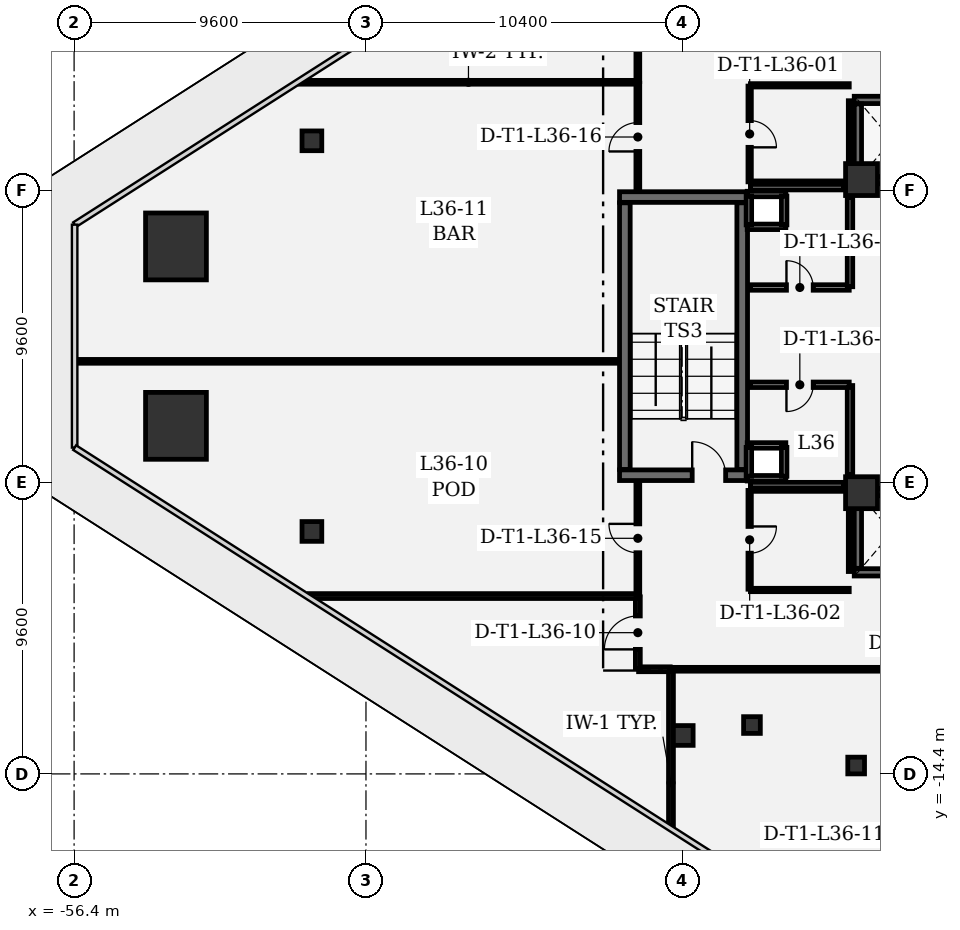
"""IFC4 building model, lengths in metres.
Left out: names, types, materials, properties, quantities, classifications, styles, units other than length and angle.
Written with IfcOpenShell. Run it as: python <this file> out.ifc"""

import sys

from ifc_helpers import new_model, si_unit, direction, frame, frame_2d, origin, origin_2d, place, context, subcontext, project, spatial, rectangle, extrude, element, fill, save


model = new_model("IFC4")
c1 = context("Model", 3, precision=1e-05, world=origin(), true_north=direction((0.0, 1.0)))
c2 = subcontext(c1, "Body", "Model", "MODEL_VIEW")
j1 = project(units=[si_unit("LENGTHUNIT", "METRE"), si_unit("PLANEANGLEUNIT", "RADIAN")], contexts=[c1])
p1 = place(None, origin())
s1 = spatial("IfcSite", under=j1, at=p1, CompositionType="ELEMENT")
p2 = place(p1, origin())
s2 = spatial("IfcBuilding", under=s1, at=p2, CompositionType="ELEMENT")
p3 = place(p2, frame((0.0, 0.0, 158.4)))
s3 = spatial("IfcBuildingStorey", under=s2, at=p3, CompositionType="ELEMENT", Elevation=158.4)
for number, where, z_axis, x_axis in (
    (1, (-53.049, 2.951, 0.0), (0.0, 0.0, 1.0), (1.0, 0.0, 0.0)),
    (2, (-53.049, -2.951, 0.0), (0.0, 0.0, 1.0), (1.0, 0.0, 0.0)),
):
    element("IfcColumn", number, at=place(p3, frame(where, z_axis=z_axis, x_axis=x_axis)), inside=s3, PredefinedType="COLUMN", context=c2, shape_type="SweptSolid", body=[
        extrude(rectangle(XDim=2.0, YDim=2.2, at=origin_2d()), origin(), (0.0, 0.0, 1.0), 4.05),
    ])
for number, where, z_axis, x_axis in (
    (3, (-30.5, 5.15, 0.0), (0.0, 0.0, 1.0), (1.0, 0.0, 0.0)),
    (4, (-30.5, -5.15, 0.0), (0.0, 0.0, 1.0), (1.0, 0.0, 0.0)),
):
    element("IfcColumn", number, at=place(p3, frame(where, z_axis=z_axis, x_axis=x_axis)), inside=s3, PredefinedType="COLUMN", context=c2, shape_type="SweptSolid", body=[
        extrude(rectangle(XDim=1.05, YDim=1.05, at=origin_2d()), origin(), (0.0, 0.0, 1.0), 4.05),
    ])
for number, where, z_axis, x_axis in (
    (5, (-48.578, 6.425, 0.0), (0.0, 0.0, 1.0), (1.0, 0.0, 0.0)),
    (6, (-48.578, -6.425, 0.0), (0.0, 0.0, 1.0), (1.0, 0.0, 0.0)),
    (7, (-36.365, -13.135, 0.0), (0.0, 0.0, 1.0), (1.0, 0.0, 0.0)),
):
    element("IfcColumn", number, at=place(p3, frame(where, z_axis=z_axis, x_axis=x_axis)), inside=s3, PredefinedType="COLUMN", context=c2, shape_type="SweptSolid", body=[
        extrude(rectangle(XDim=0.65, YDim=0.65, at=origin_2d()), origin(), (0.0, 0.0, 1.0), 4.05),
    ])
for number, where, z_axis, x_axis in (
    (8, (-34.104, -12.792, 0.0), (0.0, 0.0, 1.0), (1.0, 0.0, 0.0)),
    (9, (-30.677, -14.124, 0.0), (0.0, 0.0, 1.0), (1.0, 0.0, 0.0)),
):
    element("IfcColumn", number, at=place(p3, frame(where, z_axis=z_axis, x_axis=x_axis)), inside=s3, PredefinedType="COLUMN", context=c2, shape_type="SweptSolid", body=[
        extrude(rectangle(XDim=0.55, YDim=0.55, at=origin_2d()), origin(), (0.0, 0.0, 1.0), 4.05),
    ])
p4 = place(p3, frame((-38.46, -4.575, 0.0), z_axis=(0.0, 0.0, 1.0), x_axis=(1.0, 0.0, 0.0)))
e10 = element("IfcWall", 10, at=p4, inside=s3, PredefinedType="SHEAR", context=c2, shape_type="SweptSolid", body=[
    extrude(rectangle(XDim=4.21, YDim=0.35, at=frame_2d((2.105, 0.0))), origin(), (0.0, 0.0, 1.0), 3.78),
])
p5 = place(p4, frame((2.39, 0.0, 0.0)))
e11 = element("IfcOpeningElement", 11, at=p5, cuts=e10, PredefinedType="OPENING", context=c2, shape_type="SweptSolid", body=[
    extrude(rectangle(XDim=1.1, YDim=2.2, at=frame_2d((0.55, 1.1))), frame((0.0, 0.185, 0.0), z_axis=(0.0, -1.0, 0.0), x_axis=(1.0, 0.0, 0.0)), (0.0, 0.0, 1.0), 0.37),
])
p6 = place(p3, frame((-34.25, 4.575, 0.0), z_axis=(0.0, 0.0, 1.0), x_axis=(-1.0, 0.0, 0.0)))
e12 = element("IfcWall", 12, at=p6, inside=s3, PredefinedType="SHEAR", context=c2, shape_type="SweptSolid", body=[
    extrude(rectangle(XDim=4.21, YDim=0.35, at=frame_2d((2.105, 0.0))), origin(), (0.0, 0.0, 1.0), 3.78),
])
for number, where, z_axis, x_axis in (
    (13, (-34.425, -4.385, 0.0), (0.0, 0.0, 1.0), (0.0, 1.0, 0.0)),
    (14, (-38.285, 4.385, 0.0), (0.0, 0.0, 1.0), (0.0, -1.0, 0.0)),
):
    element("IfcWall", number, at=place(p3, frame(where, z_axis=z_axis, x_axis=x_axis)), inside=s3, PredefinedType="SHEAR", context=c2, shape_type="SweptSolid", body=[
        extrude(rectangle(XDim=8.77, YDim=0.35, at=frame_2d((4.385, 0.0))), origin(), (0.0, 0.0, 1.0), 3.78),
    ])
for number, where, z_axis, x_axis in (
    (15, (-28.26, 5.13, 0.0), (0.0, 0.0, 1.0), (-1.0, 0.0, 0.0)),
    (16, (-30.74, 7.77, 0.0), (0.0, 0.0, 1.0), (1.0, 0.0, 0.0)),
):
    element("IfcWall", number, at=place(p3, frame(where, z_axis=z_axis, x_axis=x_axis)), inside=s3, PredefinedType="SHEAR", context=c2, shape_type="SweptSolid", body=[
        extrude(rectangle(XDim=2.48, YDim=0.24, at=frame_2d((1.24, 0.0))), origin(), (0.0, 0.0, 1.0), 3.78),
    ])
p7 = place(p3, frame((-30.62, 5.262, 0.0), z_axis=(0.0, 0.0, 1.0), x_axis=(0.0, 1.0, 0.0)))
e17 = element("IfcWall", 17, at=p7, inside=s3, PredefinedType="SHEAR", context=c2, shape_type="SweptSolid", body=[
    extrude(rectangle(XDim=2.376, YDim=0.24, at=frame_2d((1.188, 0.0))), origin(), (0.0, 0.0, 1.0), 3.78),
])
for number, where, z_axis, x_axis in (
    (18, (-28.26, -7.77, 0.0), (0.0, 0.0, 1.0), (-1.0, 0.0, 0.0)),
    (19, (-30.74, -5.13, 0.0), (0.0, 0.0, 1.0), (1.0, 0.0, 0.0)),
):
    element("IfcWall", number, at=place(p3, frame(where, z_axis=z_axis, x_axis=x_axis)), inside=s3, PredefinedType="SHEAR", context=c2, shape_type="SweptSolid", body=[
        extrude(rectangle(XDim=2.48, YDim=0.24, at=frame_2d((1.24, 0.0))), origin(), (0.0, 0.0, 1.0), 3.78),
    ])
p8 = place(p3, frame((-30.62, -7.638, 0.0), z_axis=(0.0, 0.0, 1.0), x_axis=(0.0, 1.0, 0.0)))
e20 = element("IfcWall", 20, at=p8, inside=s3, PredefinedType="SHEAR", context=c2, shape_type="SweptSolid", body=[
    extrude(rectangle(XDim=2.376, YDim=0.24, at=frame_2d((1.188, 0.0))), origin(), (0.0, 0.0, 1.0), 3.78),
])
for number, where, z_axis, x_axis in (
    (21, (-32.99, 3.595, 0.0), (0.0, 0.0, 1.0), (-1.0, 0.0, 0.0)),
    (22, (-34.26, 4.675, 0.0), (0.0, 0.0, 1.0), (1.0, 0.0, 0.0)),
):
    element("IfcWall", number, at=place(p3, frame(where, z_axis=z_axis, x_axis=x_axis)), inside=s3, PredefinedType="PARTITIONING", context=c2, shape_type="SweptSolid", body=[
        extrude(rectangle(XDim=1.27, YDim=0.18, at=frame_2d((0.635, 0.0))), origin(), (0.0, 0.0, 1.0), 3.78),
    ])
for number, where, z_axis, x_axis in (
    (23, (-34.205, 3.66, 0.0), (0.0, 0.0, 1.0), (0.0, 1.0, 0.0)),
    (24, (-33.045, 4.61, 0.0), (0.0, 0.0, 1.0), (0.0, -1.0, 0.0)),
):
    element("IfcWall", number, at=place(p3, frame(where, z_axis=z_axis, x_axis=x_axis)), inside=s3, PredefinedType="PARTITIONING", context=c2, shape_type="SweptSolid", body=[
        extrude(rectangle(XDim=0.95, YDim=0.18, at=frame_2d((0.475, 0.0))), origin(), (0.0, 0.0, 1.0), 3.78),
    ])
for number, where, z_axis, x_axis in (
    (25, (-32.99, -4.675, 0.0), (0.0, 0.0, 1.0), (-1.0, 0.0, 0.0)),
    (26, (-34.26, -3.595, 0.0), (0.0, 0.0, 1.0), (1.0, 0.0, 0.0)),
):
    element("IfcWall", number, at=place(p3, frame(where, z_axis=z_axis, x_axis=x_axis)), inside=s3, PredefinedType="PARTITIONING", context=c2, shape_type="SweptSolid", body=[
        extrude(rectangle(XDim=1.27, YDim=0.18, at=frame_2d((0.635, 0.0))), origin(), (0.0, 0.0, 1.0), 3.78),
    ])
for number, where, z_axis, x_axis in (
    (27, (-34.205, -4.61, 0.0), (0.0, 0.0, 1.0), (0.0, 1.0, 0.0)),
    (28, (-33.045, -3.66, 0.0), (0.0, 0.0, 1.0), (0.0, -1.0, 0.0)),
):
    element("IfcWall", number, at=place(p3, frame(where, z_axis=z_axis, x_axis=x_axis)), inside=s3, PredefinedType="PARTITIONING", context=c2, shape_type="SweptSolid", body=[
        extrude(rectangle(XDim=0.95, YDim=0.18, at=frame_2d((0.475, 0.0))), origin(), (0.0, 0.0, 1.0), 3.78),
    ])
p9 = place(p3, frame((-34.18, 8.225, 0.0), z_axis=(0.0, 0.0, 1.0), x_axis=(0.0, -1.0, 0.0)))
e29 = element("IfcWall", 29, at=p9, inside=s3, PredefinedType="PARTITIONING", context=c2, shape_type="SweptSolid", body=[
    extrude(rectangle(XDim=3.15, YDim=0.11, at=frame_2d((1.575, 0.0))), origin(), (0.0, 0.0, 1.0), 3.78),
])
p10 = place(p9, frame((1.135, 0.0, 0.0)))
e30 = element("IfcOpeningElement", 30, at=p10, cuts=e29, PredefinedType="OPENING", context=c2, shape_type="SweptSolid", body=[
    extrude(rectangle(XDim=0.88, YDim=2.1, at=frame_2d((0.44, 1.05))), frame((0.0, 0.065, 0.0), z_axis=(0.0, -1.0, 0.0), x_axis=(1.0, 0.0, 0.0)), (0.0, 0.0, 1.0), 0.13),
])
p11 = place(p3, frame((-34.155, 5.05, 0.0), z_axis=(0.0, 0.0, 1.0), x_axis=(1.0, 0.0, 0.0)))
e31 = element("IfcWall", 31, at=p11, inside=s3, PredefinedType="PARTITIONING", context=c2, shape_type="SweptSolid", body=[
    extrude(rectangle(XDim=3.065, YDim=0.11, at=frame_2d((1.532, 0.0))), origin(), (0.0, 0.0, 1.0), 3.78),
])
p12 = place(p3, frame((-30.88, 5.74, 0.0), z_axis=(0.0, 0.0, 1.0), x_axis=(0.0, 1.0, 0.0)))
e32 = element("IfcWall", 32, at=p12, inside=s3, PredefinedType="PARTITIONING", context=c2, shape_type="SweptSolid", body=[
    extrude(rectangle(XDim=2.003, YDim=0.11, at=frame_2d((1.001, 0.0))), origin(), (0.0, 0.0, 1.0), 3.78),
])
for number, where, z_axis, x_axis in (
    (33, (-30.905, 8.25, 0.0), (0.0, 0.0, 1.0), (-1.0, 0.0, 0.0)),
    (34, (-34.155, -8.35, 0.0), (0.0, 0.0, 1.0), (1.0, 0.0, 0.0)),
):
    element("IfcWall", number, at=place(p3, frame(where, z_axis=z_axis, x_axis=x_axis)), inside=s3, PredefinedType="PARTITIONING", context=c2, shape_type="SweptSolid", body=[
        extrude(rectangle(XDim=3.25, YDim=0.11, at=frame_2d((1.625, 0.0))), origin(), (0.0, 0.0, 1.0), 3.78),
    ])
p13 = place(p3, frame((-30.88, -7.743, 0.0), z_axis=(0.0, 0.0, 1.0), x_axis=(0.0, 1.0, 0.0)))
e35 = element("IfcWall", 35, at=p13, inside=s3, PredefinedType="PARTITIONING", context=c2, shape_type="SweptSolid", body=[
    extrude(rectangle(XDim=2.003, YDim=0.11, at=frame_2d((1.001, 0.0))), origin(), (0.0, 0.0, 1.0), 3.78),
])
p14 = place(p3, frame((-31.09, -5.05, 0.0), z_axis=(0.0, 0.0, 1.0), x_axis=(-1.0, 0.0, 0.0)))
e36 = element("IfcWall", 36, at=p14, inside=s3, PredefinedType="PARTITIONING", context=c2, shape_type="SweptSolid", body=[
    extrude(rectangle(XDim=3.065, YDim=0.11, at=frame_2d((1.532, 0.0))), origin(), (0.0, 0.0, 1.0), 3.78),
])
p15 = place(p3, frame((-34.18, -5.075, 0.0), z_axis=(0.0, 0.0, 1.0), x_axis=(0.0, -1.0, 0.0)))
e37 = element("IfcWall", 37, at=p15, inside=s3, PredefinedType="PARTITIONING", context=c2, shape_type="SweptSolid", body=[
    extrude(rectangle(XDim=3.25, YDim=0.11, at=frame_2d((1.625, 0.0))), origin(), (0.0, 0.0, 1.0), 3.78),
])
p16 = place(p15, frame((1.185, 0.0, 0.0)))
e38 = element("IfcOpeningElement", 38, at=p16, cuts=e37, PredefinedType="OPENING", context=c2, shape_type="SweptSolid", body=[
    extrude(rectangle(XDim=0.88, YDim=2.1, at=frame_2d((0.44, 1.05))), frame((0.0, 0.065, 0.0), z_axis=(0.0, -1.0, 0.0), x_axis=(1.0, 0.0, 0.0)), (0.0, 0.0, 1.0), 0.13),
])
p17 = place(p3, frame((-34.155, 1.6, 0.0), z_axis=(0.0, 0.0, 1.0), x_axis=(1.0, 0.0, 0.0)))
e39 = element("IfcWall", 39, at=p17, inside=s3, PredefinedType="PARTITIONING", context=c2, shape_type="SweptSolid", body=[
    extrude(rectangle(XDim=3.25, YDim=0.18, at=frame_2d((1.625, 0.0))), origin(), (0.0, 0.0, 1.0), 3.78),
])
p18 = place(p17, frame((1.185, 0.0, 0.0)))
e40 = element("IfcOpeningElement", 40, at=p18, cuts=e39, PredefinedType="OPENING", context=c2, shape_type="SweptSolid", body=[
    extrude(rectangle(XDim=0.88, YDim=2.1, at=frame_2d((0.44, 1.05))), frame((0.0, 0.1, 0.0), z_axis=(0.0, -1.0, 0.0), x_axis=(1.0, 0.0, 0.0)), (0.0, 0.0, 1.0), 0.2),
])
p19 = place(p3, frame((-30.88, 1.625, 0.0), z_axis=(0.0, 0.0, 1.0), x_axis=(0.0, 1.0, 0.0)))
e41 = element("IfcWall", 41, at=p19, inside=s3, PredefinedType="PARTITIONING", context=c2, shape_type="SweptSolid", body=[
    extrude(rectangle(XDim=2.935, YDim=0.18, at=frame_2d((1.468, 0.0))), origin(), (0.0, 0.0, 1.0), 3.78),
])
for number, where, z_axis, x_axis in (
    (42, (-31.09, 4.9, 0.0), (0.0, 0.0, 1.0), (-1.0, 0.0, 0.0)),
    (43, (-34.155, -4.9, 0.0), (0.0, 0.0, 1.0), (1.0, 0.0, 0.0)),
):
    element("IfcWall", number, at=place(p3, frame(where, z_axis=z_axis, x_axis=x_axis)), inside=s3, PredefinedType="PARTITIONING", context=c2, shape_type="SweptSolid", body=[
        extrude(rectangle(XDim=3.065, YDim=0.18, at=frame_2d((1.532, 0.0))), origin(), (0.0, 0.0, 1.0), 3.78),
    ])
p20 = place(p3, frame((-30.88, -4.56, 0.0), z_axis=(0.0, 0.0, 1.0), x_axis=(0.0, 1.0, 0.0)))
e44 = element("IfcWall", 44, at=p20, inside=s3, PredefinedType="PARTITIONING", context=c2, shape_type="SweptSolid", body=[
    extrude(rectangle(XDim=2.935, YDim=0.18, at=frame_2d((1.468, 0.0))), origin(), (0.0, 0.0, 1.0), 3.78),
])
p21 = place(p3, frame((-30.905, -1.6, 0.0), z_axis=(0.0, 0.0, 1.0), x_axis=(-1.0, 0.0, 0.0)))
e45 = element("IfcWall", 45, at=p21, inside=s3, PredefinedType="PARTITIONING", context=c2, shape_type="SweptSolid", body=[
    extrude(rectangle(XDim=3.25, YDim=0.18, at=frame_2d((1.625, 0.0))), origin(), (0.0, 0.0, 1.0), 3.78),
])
p22 = place(p21, frame((1.185, 0.0, 0.0)))
e46 = element("IfcOpeningElement", 46, at=p22, cuts=e45, PredefinedType="OPENING", context=c2, shape_type="SweptSolid", body=[
    extrude(rectangle(XDim=0.88, YDim=2.1, at=frame_2d((0.44, 1.05))), frame((0.0, 0.1, 0.0), z_axis=(0.0, -1.0, 0.0), x_axis=(1.0, 0.0, 0.0)), (0.0, 0.0, 1.0), 0.2),
])
p23 = place(p3, frame((-48.975, 8.35, 0.0), z_axis=(0.0, 0.0, 1.0), x_axis=(1.0, 0.0, 0.0)))
e47 = element("IfcWall", 47, at=p23, inside=s3, PredefinedType="PARTITIONING", context=c2, shape_type="SweptSolid", body=[
    extrude(rectangle(XDim=11.092, YDim=0.125, at=frame_2d((5.546, 0.0))), origin(), (0.0, 0.0, 1.0), 2.9),
])
p24 = place(p3, frame((-37.858, 8.375, 0.0), z_axis=(0.0, 0.0, 1.0), x_axis=(0.0, 1.0, 0.0)))
e48 = element("IfcWall", 48, at=p24, inside=s3, PredefinedType="PARTITIONING", context=c2, shape_type="SweptSolid", body=[
    extrude(rectangle(XDim=2.358, YDim=0.125, at=frame_2d((1.179, 0.0))), origin(), (0.0, 0.0, 1.0), 3.78),
])
p25 = place(p3, frame((-36.768, -16.123, 0.0), z_axis=(0.0, 0.0, 1.0), x_axis=(0.0, 1.0, 0.0)))
e49 = element("IfcWall", 49, at=p25, inside=s3, PredefinedType="PARTITIONING", context=c2, shape_type="SweptSolid", body=[
    extrude(rectangle(XDim=5.14, YDim=0.16, at=frame_2d((2.57, 0.0))), origin(), (0.0, 0.0, 1.0), 3.78),
])
p26 = place(p3, frame((-36.793, -10.958, 0.0), z_axis=(0.0, 0.0, 1.0), x_axis=(-1.0, 0.0, 0.0)))
e50 = element("IfcWall", 50, at=p26, inside=s3, PredefinedType="PARTITIONING", context=c2, shape_type="SweptSolid", body=[
    extrude(rectangle(XDim=1.04, YDim=0.16, at=frame_2d((0.52, 0.0))), origin(), (0.0, 0.0, 1.0), 3.78),
])
p27 = place(p3, frame((-37.858, -10.933, 0.0), z_axis=(0.0, 0.0, 1.0), x_axis=(0.0, 1.0, 0.0)))
e51 = element("IfcWall", 51, at=p27, inside=s3, PredefinedType="PARTITIONING", context=c2, shape_type="SweptSolid", body=[
    extrude(rectangle(XDim=2.358, YDim=0.16, at=frame_2d((1.179, 0.0))), origin(), (0.0, 0.0, 1.0), 3.78),
])
p28 = place(p27, frame((0.629, 0.0, 0.0)))
e52 = element("IfcOpeningElement", 52, at=p28, cuts=e51, PredefinedType="OPENING", context=c2, shape_type="SweptSolid", body=[
    extrude(rectangle(XDim=1.1, YDim=2.15, at=frame_2d((0.55, 1.075))), frame((0.0, 0.09, 0.0), z_axis=(0.0, -1.0, 0.0), x_axis=(1.0, 0.0, 0.0)), (0.0, 0.0, 1.0), 0.18),
])
p29 = place(p3, frame((-37.883, -8.55, 0.0), z_axis=(0.0, 0.0, 1.0), x_axis=(-1.0, 0.0, 0.0)))
e53 = element("IfcWall", 53, at=p29, inside=s3, PredefinedType="PARTITIONING", context=c2, shape_type="SweptSolid", body=[
    extrude(rectangle(XDim=10.779, YDim=0.16, at=frame_2d((5.39, 0.0))), origin(), (0.0, 0.0, 1.0), 2.9),
])
p30 = place(p3, frame((-28.633, -10.958, 0.0), z_axis=(0.0, 0.0, 1.0), x_axis=(-1.0, 0.0, 0.0)))
e54 = element("IfcWall", 54, at=p30, inside=s3, PredefinedType="PARTITIONING", context=c2, shape_type="SweptSolid", body=[
    extrude(rectangle(XDim=8.102, YDim=0.125, at=frame_2d((4.051, 0.0))), origin(), (0.0, 0.0, 1.0), 3.344),
])
p31 = place(p3, frame((-37.858, -8.517, 0.0), z_axis=(0.0, 0.0, 1.0), x_axis=(0.0, 1.0, 0.0)))
e55 = element("IfcWall", 55, at=p31, inside=s3, PredefinedType="PARTITIONING", context=c2, shape_type="SweptSolid", body=[
    extrude(rectangle(XDim=3.734, YDim=0.125, at=frame_2d((1.867, 0.0))), origin(), (0.0, 0.0, 1.0), 3.78),
])
p32 = place(p31, frame((1.392, 0.0, 0.0)))
e56 = element("IfcOpeningElement", 56, at=p32, cuts=e55, PredefinedType="OPENING", context=c2, shape_type="SweptSolid", body=[
    extrude(rectangle(XDim=0.95, YDim=2.15, at=frame_2d((0.475, 1.075))), frame((0.0, 0.073, 0.0), z_axis=(0.0, -1.0, 0.0), x_axis=(1.0, 0.0, 0.0)), (0.0, 0.0, 1.0), 0.145),
])
p33 = place(p3, frame((-38.493, -0.829, 0.0), z_axis=(0.0, 0.0, 1.0), x_axis=(-1.0, 0.0, 0.0)))
e57 = element("IfcWall", 57, at=p33, inside=s3, PredefinedType="PARTITIONING", context=c2, shape_type="SweptSolid", body=[
    extrude(rectangle(XDim=17.81, YDim=0.125, at=frame_2d((8.905, 0.0))), origin(), (0.0, 0.0, 1.0), 3.78),
])
p34 = place(p3, frame((-37.858, 4.783, 0.0), z_axis=(0.0, 0.0, 1.0), x_axis=(0.0, 1.0, 0.0)))
e58 = element("IfcWall", 58, at=p34, inside=s3, PredefinedType="PARTITIONING", context=c2, shape_type="SweptSolid", body=[
    extrude(rectangle(XDim=3.534, YDim=0.125, at=frame_2d((1.767, 0.0))), origin(), (0.0, 0.0, 1.0), 3.78),
])
p35 = place(p34, frame((1.292, 0.0, 0.0)))
e59 = element("IfcOpeningElement", 59, at=p35, cuts=e58, PredefinedType="OPENING", context=c2, shape_type="SweptSolid", body=[
    extrude(rectangle(XDim=0.95, YDim=2.15, at=frame_2d((0.475, 1.075))), frame((0.0, 0.073, 0.0), z_axis=(0.0, -1.0, 0.0), x_axis=(1.0, 0.0, 0.0)), (0.0, 0.0, 1.0), 0.145),
])
p36 = place(p5, origin())
e60 = element("IfcDoor", 60, at=p36, inside=s3, OperationType="SINGLE_SWING_LEFT", PredefinedType="DOOR", context=c2, shape_type="SweptSolid", body=[
    extrude(rectangle(XDim=1.1, YDim=2.2, at=frame_2d((0.55, 1.1))), frame((0.0, 0.025, 0.0), z_axis=(0.0, -1.0, 0.0), x_axis=(1.0, 0.0, 0.0)), (0.0, 0.0, 1.0), 0.05),
])
fill(e11, e60)
p37 = place(p10, origin())
e61 = element("IfcDoor", 61, at=p37, inside=s3, OperationType="SINGLE_SWING_RIGHT", PredefinedType="DOOR", context=c2, shape_type="SweptSolid", body=[
    extrude(rectangle(XDim=0.88, YDim=2.1, at=frame_2d((0.44, 1.05))), frame((0.0, 0.025, 0.0), z_axis=(0.0, -1.0, 0.0), x_axis=(1.0, 0.0, 0.0)), (0.0, 0.0, 1.0), 0.05),
])
fill(e30, e61)
p38 = place(p16, origin())
e62 = element("IfcDoor", 62, at=p38, inside=s3, OperationType="SINGLE_SWING_LEFT", PredefinedType="DOOR", context=c2, shape_type="SweptSolid", body=[
    extrude(rectangle(XDim=0.88, YDim=2.1, at=frame_2d((0.44, 1.05))), frame((0.0, 0.025, 0.0), z_axis=(0.0, -1.0, 0.0), x_axis=(1.0, 0.0, 0.0)), (0.0, 0.0, 1.0), 0.05),
])
fill(e38, e62)
p39 = place(p18, origin())
e63 = element("IfcDoor", 63, at=p39, inside=s3, OperationType="SINGLE_SWING_LEFT", PredefinedType="DOOR", context=c2, shape_type="SweptSolid", body=[
    extrude(rectangle(XDim=0.88, YDim=2.1, at=frame_2d((0.44, 1.05))), frame((0.0, 0.025, 0.0), z_axis=(0.0, -1.0, 0.0), x_axis=(1.0, 0.0, 0.0)), (0.0, 0.0, 1.0), 0.05),
])
fill(e40, e63)
p40 = place(p22, origin())
e64 = element("IfcDoor", 64, at=p40, inside=s3, OperationType="SINGLE_SWING_RIGHT", PredefinedType="DOOR", context=c2, shape_type="SweptSolid", body=[
    extrude(rectangle(XDim=0.88, YDim=2.1, at=frame_2d((0.44, 1.05))), frame((0.0, 0.025, 0.0), z_axis=(0.0, -1.0, 0.0), x_axis=(1.0, 0.0, 0.0)), (0.0, 0.0, 1.0), 0.05),
])
fill(e46, e64)
p41 = place(p28, origin())
e65 = element("IfcDoor", 65, at=p41, inside=s3, OperationType="SINGLE_SWING_LEFT", PredefinedType="DOOR", context=c2, shape_type="SweptSolid", body=[
    extrude(rectangle(XDim=1.1, YDim=2.15, at=frame_2d((0.55, 1.075))), frame((0.0, 0.025, 0.0), z_axis=(0.0, -1.0, 0.0), x_axis=(1.0, 0.0, 0.0)), (0.0, 0.0, 1.0), 0.05),
])
fill(e52, e65)
p42 = place(p32, origin())
e66 = element("IfcDoor", 66, at=p42, inside=s3, OperationType="SINGLE_SWING_RIGHT", PredefinedType="DOOR", context=c2, shape_type="SweptSolid", body=[
    extrude(rectangle(XDim=0.95, YDim=2.15, at=frame_2d((0.475, 1.075))), frame((0.0, 0.025, 0.0), z_axis=(0.0, -1.0, 0.0), x_axis=(1.0, 0.0, 0.0)), (0.0, 0.0, 1.0), 0.05),
])
fill(e56, e66)
p43 = place(p35, origin())
e67 = element("IfcDoor", 67, at=p43, inside=s3, OperationType="SINGLE_SWING_LEFT", PredefinedType="DOOR", context=c2, shape_type="SweptSolid", body=[
    extrude(rectangle(XDim=0.95, YDim=2.15, at=frame_2d((0.475, 1.075))), frame((0.0, 0.025, 0.0), z_axis=(0.0, -1.0, 0.0), x_axis=(1.0, 0.0, 0.0)), (0.0, 0.0, 1.0), 0.05),
])
fill(e59, e67)
save(model, sys.argv[1])
